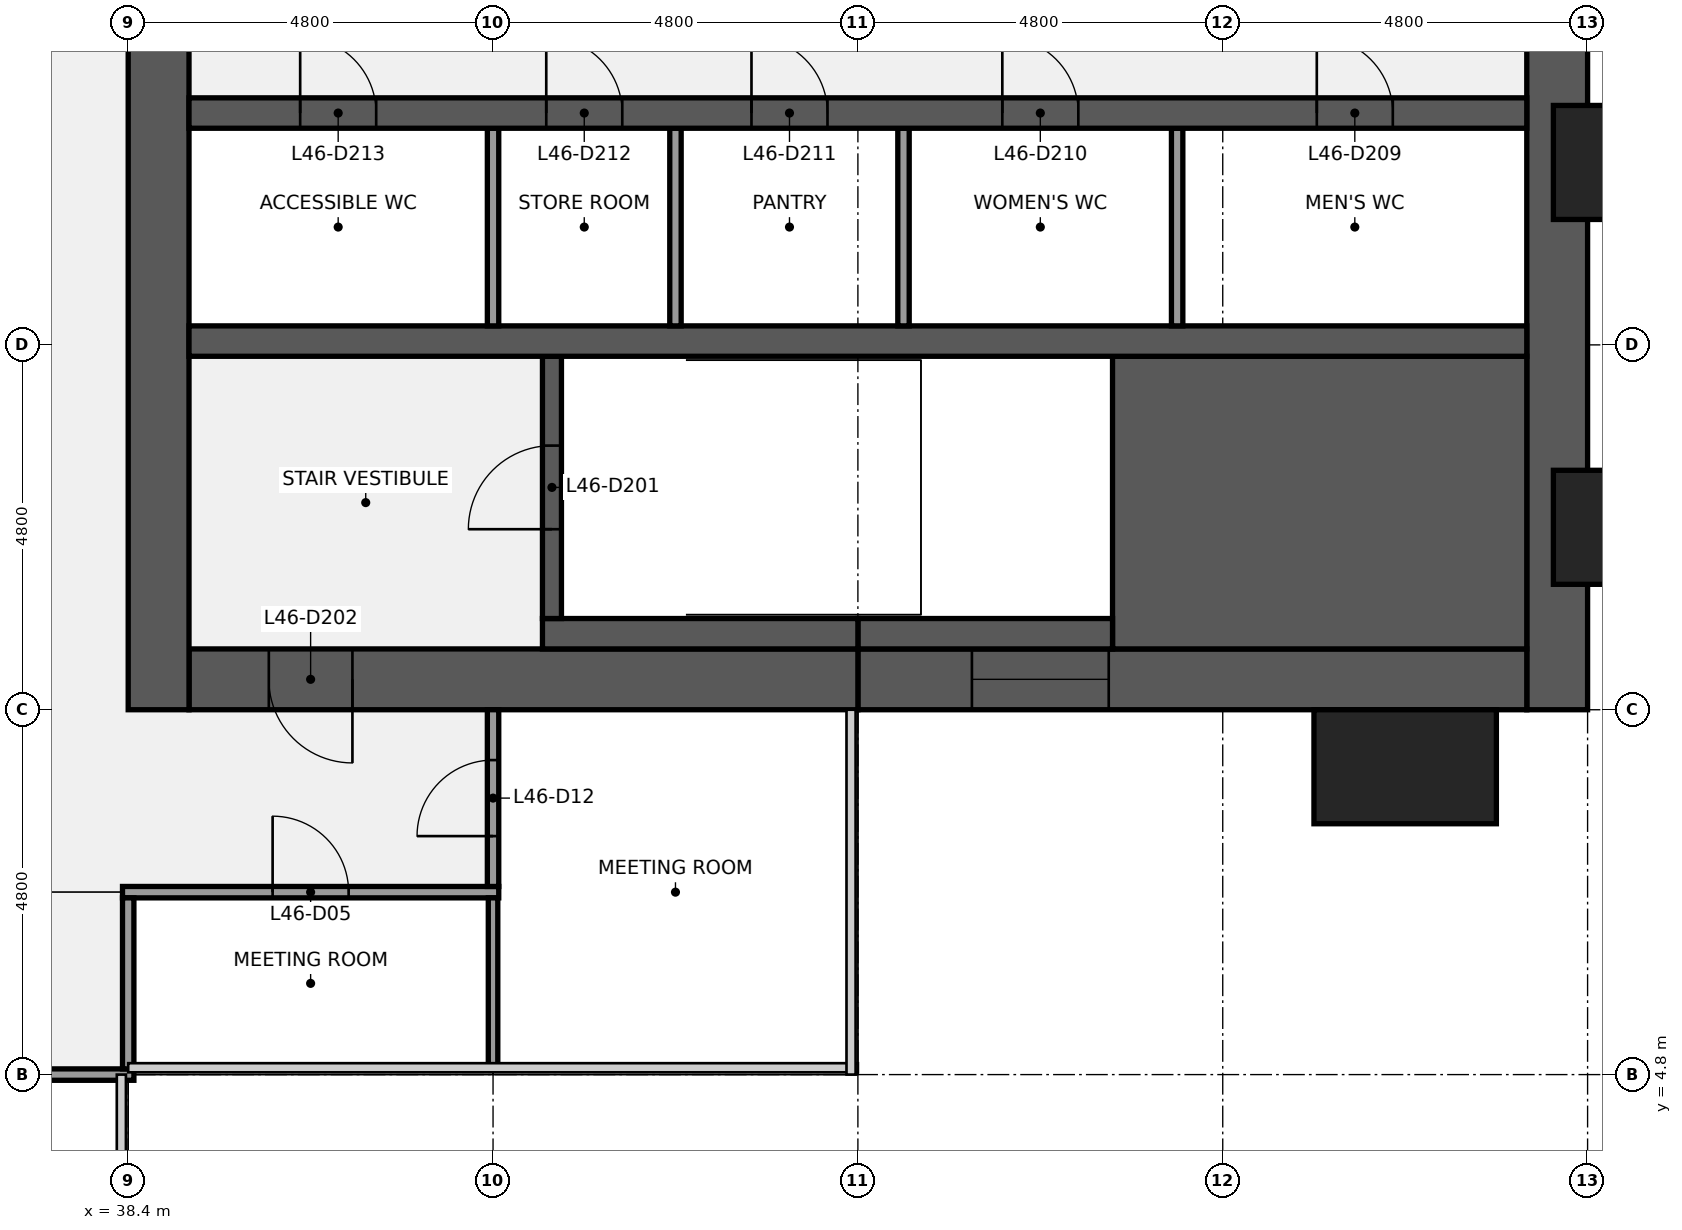
"""IFC4 building model, lengths in metres.
Left out: names, types, materials, properties, quantities, classifications, styles, units other than length and angle.
Written with IfcOpenShell. Run it as: python <this file> out.ifc"""

import sys

from ifc_helpers import new_model, si_unit, direction, frame, frame_2d, origin, origin_2d, place, context, subcontext, project, spatial, rectangle, extrude, element, fill, save


model = new_model("IFC4")
c1 = context("Model", 3, precision=1e-05, world=origin(), true_north=direction((0.0, 1.0)))
c2 = subcontext(c1, "Body", "Model", "MODEL_VIEW")
j1 = project(units=[si_unit("LENGTHUNIT", "METRE"), si_unit("PLANEANGLEUNIT", "RADIAN")], contexts=[c1])
p1 = place(None, origin())
s1 = spatial("IfcSite", under=j1, at=p1, CompositionType="ELEMENT")
p2 = place(p1, origin())
s2 = spatial("IfcBuilding", under=s1, at=p2, CompositionType="ELEMENT")
p3 = place(p2, frame((0.0, 0.0, 213.2)))
s3 = spatial("IfcBuildingStorey", under=s2, at=p3, CompositionType="ELEMENT", Elevation=213.2)
p4 = place(p3, frame((57.2, 38.4, 0.0), z_axis=(0.0, 0.0, 1.0), x_axis=(0.0, -1.0, 0.0)))
e1 = element("IfcWall", 1, at=p4, inside=s3, PredefinedType="SHEAR", context=c2, shape_type="SweptSolid", body=[
    extrude(rectangle(XDim=28.8, YDim=0.8, at=frame_2d((14.4, 0.0))), origin(), (0.0, 0.0, 1.0), 3.84),
])
p5 = place(p4, frame((18.45, 0.0, 0.9)))
e2 = element("IfcOpeningElement", 2, at=p5, cuts=e1, PredefinedType="OPENING", context=c2, shape_type="SweptSolid", body=[
    extrude(rectangle(XDim=1.5, YDim=1.5, at=frame_2d((0.75, 0.75))), frame((0.0, 0.41, 0.0), z_axis=(0.0, -1.0, 0.0), x_axis=(1.0, 0.0, 0.0)), (0.0, 0.0, 1.0), 0.82),
])
p6 = place(p4, frame((8.85, 0.0, 0.9)))
e3 = element("IfcOpeningElement", 3, at=p6, cuts=e1, PredefinedType="OPENING", context=c2, shape_type="SweptSolid", body=[
    extrude(rectangle(XDim=1.5, YDim=1.5, at=frame_2d((0.75, 0.75))), frame((0.0, 0.41, 0.0), z_axis=(0.0, -1.0, 0.0), x_axis=(1.0, 0.0, 0.0)), (0.0, 0.0, 1.0), 0.82),
])
p7 = place(p3, frame((56.8, 10.0, 0.0), z_axis=(0.0, 0.0, 1.0), x_axis=(-1.0, 0.0, 0.0)))
e4 = element("IfcWall", 4, at=p7, inside=s3, PredefinedType="SHEAR", context=c2, shape_type="SweptSolid", body=[
    extrude(rectangle(XDim=8.8, YDim=0.8, at=frame_2d((4.4, 0.0))), origin(), (0.0, 0.0, 1.0), 3.84),
])
p8 = place(p7, frame((5.5, 0.0, 0.9)))
e5 = element("IfcOpeningElement", 5, at=p8, cuts=e4, PredefinedType="OPENING", context=c2, shape_type="SweptSolid", body=[
    extrude(rectangle(XDim=1.8, YDim=1.5, at=frame_2d((0.9, 0.75))), frame((0.0, 0.41, 0.0), z_axis=(0.0, -1.0, 0.0), x_axis=(1.0, 0.0, 0.0)), (0.0, 0.0, 1.0), 0.82),
])
p9 = place(p3, frame((48.0, 10.0, 0.0), z_axis=(0.0, 0.0, 1.0), x_axis=(-1.0, 0.0, 0.0)))
e6 = element("IfcWall", 6, at=p9, inside=s3, PredefinedType="SHEAR", context=c2, shape_type="SweptSolid", body=[
    extrude(rectangle(XDim=8.8, YDim=0.8, at=frame_2d((4.4, 0.0))), origin(), (0.0, 0.0, 1.0), 3.84),
])
p10 = place(p9, frame((6.65, 0.0, 0.0)))
e7 = element("IfcOpeningElement", 7, at=p10, cuts=e6, PredefinedType="OPENING", context=c2, shape_type="SweptSolid", body=[
    extrude(rectangle(XDim=1.1, YDim=2.1, at=frame_2d((0.55, 1.05))), frame((0.0, 0.41, 0.0), z_axis=(0.0, -1.0, 0.0), x_axis=(1.0, 0.0, 0.0)), (0.0, 0.0, 1.0), 0.82),
])
p11 = place(p3, frame((38.8, 9.6, 0.0), z_axis=(0.0, 0.0, 1.0), x_axis=(0.0, 1.0, 0.0)))
e8 = element("IfcWall", 8, at=p11, inside=s3, PredefinedType="SHEAR", context=c2, shape_type="SweptSolid", body=[
    extrude(rectangle(XDim=28.8, YDim=0.8, at=frame_2d((14.4, 0.0))), origin(), (0.0, 0.0, 1.0), 3.84),
])
p12 = place(p11, frame((8.7, 0.0, 0.0)))
e9 = element("IfcOpeningElement", 9, at=p12, cuts=e8, PredefinedType="OPENING", context=c2, shape_type="SweptSolid", body=[
    extrude(rectangle(XDim=1.8, YDim=2.1, at=frame_2d((0.9, 1.05))), frame((0.0, 0.41, 0.0), z_axis=(0.0, -1.0, 0.0), x_axis=(1.0, 0.0, 0.0)), (0.0, 0.0, 1.0), 0.82),
])
p13 = place(p11, frame((18.3, 0.0, 0.0)))
e10 = element("IfcOpeningElement", 10, at=p13, cuts=e8, PredefinedType="OPENING", context=c2, shape_type="SweptSolid", body=[
    extrude(rectangle(XDim=1.8, YDim=2.1, at=frame_2d((0.9, 1.05))), frame((0.0, 0.41, 0.0), z_axis=(0.0, -1.0, 0.0), x_axis=(1.0, 0.0, 0.0)), (0.0, 0.0, 1.0), 0.82),
])
p14 = place(p3, frame((51.35, 12.325, 0.0), z_axis=(0.0, 0.0, 1.0), x_axis=(1.0, 0.0, 0.0)))
e11 = element("IfcWall", 11, at=p14, inside=s3, PredefinedType="SHEAR", context=c2, shape_type="SweptSolid", body=[
    extrude(rectangle(XDim=5.45, YDim=3.85, at=frame_2d((2.725, 0.0))), origin(), (0.0, 0.0, 1.0), 3.84),
])
p15 = place(p3, frame((48.0, 10.6, 0.0), z_axis=(0.0, 0.0, 1.0), x_axis=(1.0, 0.0, 0.0)))
e12 = element("IfcWall", 12, at=p15, inside=s3, PredefinedType="SHEAR", context=c2, shape_type="SweptSolid", body=[
    extrude(rectangle(XDim=3.35, YDim=0.4, at=frame_2d((1.675, 0.0))), origin(), (0.0, 0.0, 1.0), 3.84),
])
p16 = place(p3, frame((43.85, 10.6, 0.0), z_axis=(0.0, 0.0, 1.0), x_axis=(1.0, 0.0, 0.0)))
e13 = element("IfcWall", 13, at=p16, inside=s3, PredefinedType="SHEAR", context=c2, shape_type="SweptSolid", body=[
    extrude(rectangle(XDim=4.15, YDim=0.4, at=frame_2d((2.075, 0.0))), origin(), (0.0, 0.0, 1.0), 3.84),
])
p17 = place(p3, frame((43.975, 10.8, 0.0), z_axis=(0.0, 0.0, 1.0), x_axis=(0.0, 1.0, 0.0)))
e14 = element("IfcWall", 14, at=p17, inside=s3, PredefinedType="SHEAR", context=c2, shape_type="SweptSolid", body=[
    extrude(rectangle(XDim=3.45, YDim=0.25, at=frame_2d((1.725, 0.0))), origin(), (0.0, 0.0, 1.0), 3.84),
])
p18 = place(p17, frame((1.175, 0.0, 0.0)))
e15 = element("IfcOpeningElement", 15, at=p18, cuts=e14, PredefinedType="OPENING", context=c2, shape_type="SweptSolid", body=[
    extrude(rectangle(XDim=1.1, YDim=2.1, at=frame_2d((0.55, 1.05))), frame((0.0, 0.135, 0.0), z_axis=(0.0, -1.0, 0.0), x_axis=(1.0, 0.0, 0.0)), (0.0, 0.0, 1.0), 0.27),
])
p19 = place(p3, frame((39.2, 14.45, 0.0), z_axis=(0.0, 0.0, 1.0), x_axis=(1.0, 0.0, 0.0)))
e16 = element("IfcWall", 16, at=p19, inside=s3, PredefinedType="SHEAR", context=c2, shape_type="SweptSolid", body=[
    extrude(rectangle(XDim=17.6, YDim=0.4, at=frame_2d((8.8, 0.0))), origin(), (0.0, 0.0, 1.0), 3.84),
])
for number, where, z_axis, x_axis in (
    (17, (52.2, 14.65, 0.0), (0.0, 0.0, 1.0), (0.0, 1.0, 0.0)),
    (18, (48.6, 14.65, 0.0), (0.0, 0.0, 1.0), (0.0, 1.0, 0.0)),
    (19, (45.6, 14.65, 0.0), (0.0, 0.0, 1.0), (0.0, 1.0, 0.0)),
    (20, (43.2, 14.65, 0.0), (0.0, 0.0, 1.0), (0.0, 1.0, 0.0)),
):
    element("IfcWall", number, at=place(p3, frame(where, z_axis=z_axis, x_axis=x_axis)), inside=s3, PredefinedType="PARTITIONING", context=c2, shape_type="SweptSolid", body=[
        extrude(rectangle(XDim=2.6, YDim=0.15, at=frame_2d((1.3, 0.0))), origin(), (0.0, 0.0, 1.0), 3.84),
    ])
p20 = place(p3, frame((39.2, 17.45, 0.0), z_axis=(0.0, 0.0, 1.0), x_axis=(1.0, 0.0, 0.0)))
e21 = element("IfcWall", 21, at=p20, inside=s3, PredefinedType="SHEAR", context=c2, shape_type="SweptSolid", body=[
    extrude(rectangle(XDim=17.6, YDim=0.4, at=frame_2d((8.8, 0.0))), origin(), (0.0, 0.0, 1.0), 3.84),
])
p21 = place(p20, frame((14.837, 0.0, 0.0)))
e22 = element("IfcOpeningElement", 22, at=p21, cuts=e21, PredefinedType="OPENING", context=c2, shape_type="SweptSolid", body=[
    extrude(rectangle(XDim=1.0, YDim=2.1, at=frame_2d((0.5, 1.05))), frame((0.0, 0.21, 0.0), z_axis=(0.0, -1.0, 0.0), x_axis=(1.0, 0.0, 0.0)), (0.0, 0.0, 1.0), 0.42),
])
p22 = place(p20, frame((10.7, 0.0, 0.0)))
e23 = element("IfcOpeningElement", 23, at=p22, cuts=e21, PredefinedType="OPENING", context=c2, shape_type="SweptSolid", body=[
    extrude(rectangle(XDim=1.0, YDim=2.1, at=frame_2d((0.5, 1.05))), frame((0.0, 0.21, 0.0), z_axis=(0.0, -1.0, 0.0), x_axis=(1.0, 0.0, 0.0)), (0.0, 0.0, 1.0), 0.42),
])
p23 = place(p20, frame((7.4, 0.0, 0.0)))
e24 = element("IfcOpeningElement", 24, at=p23, cuts=e21, PredefinedType="OPENING", context=c2, shape_type="SweptSolid", body=[
    extrude(rectangle(XDim=1.0, YDim=2.1, at=frame_2d((0.5, 1.05))), frame((0.0, 0.21, 0.0), z_axis=(0.0, -1.0, 0.0), x_axis=(1.0, 0.0, 0.0)), (0.0, 0.0, 1.0), 0.42),
])
p24 = place(p20, frame((4.7, 0.0, 0.0)))
e25 = element("IfcOpeningElement", 25, at=p24, cuts=e21, PredefinedType="OPENING", context=c2, shape_type="SweptSolid", body=[
    extrude(rectangle(XDim=1.0, YDim=2.1, at=frame_2d((0.5, 1.05))), frame((0.0, 0.21, 0.0), z_axis=(0.0, -1.0, 0.0), x_axis=(1.0, 0.0, 0.0)), (0.0, 0.0, 1.0), 0.42),
])
p25 = place(p20, frame((1.462, 0.0, 0.0)))
e26 = element("IfcOpeningElement", 26, at=p25, cuts=e21, PredefinedType="OPENING", context=c2, shape_type="SweptSolid", body=[
    extrude(rectangle(XDim=1.0, YDim=2.1, at=frame_2d((0.5, 1.05))), frame((0.0, 0.21, 0.0), z_axis=(0.0, -1.0, 0.0), x_axis=(1.0, 0.0, 0.0)), (0.0, 0.0, 1.0), 0.42),
])
p26 = place(p3, frame((19.125, 4.8, 0.0), z_axis=(0.0, 0.0, 1.0), x_axis=(1.0, 0.0, 0.0)))
e27 = element("IfcWall", 27, at=p26, inside=s3, PredefinedType="PARTITIONING", context=c2, shape_type="SweptSolid", body=[
    extrude(rectangle(XDim=19.35, YDim=0.15, at=frame_2d((9.675, 0.0))), origin(), (0.0, 0.0, 1.0), 2.87),
])
p27 = place(p26, frame((4.375, 0.0, 0.0)))
e28 = element("IfcOpeningElement", 28, at=p27, cuts=e27, PredefinedType="OPENING", context=c2, shape_type="SweptSolid", body=[
    extrude(rectangle(XDim=1.0, YDim=2.1, at=frame_2d((0.5, 1.05))), frame((0.0, 0.085, 0.0), z_axis=(0.0, -1.0, 0.0), x_axis=(1.0, 0.0, 0.0)), (0.0, 0.0, 1.0), 0.17),
])
p28 = place(p26, frame((13.975, 0.0, 0.0)))
e29 = element("IfcOpeningElement", 29, at=p28, cuts=e27, PredefinedType="OPENING", context=c2, shape_type="SweptSolid", body=[
    extrude(rectangle(XDim=1.0, YDim=2.1, at=frame_2d((0.5, 1.05))), frame((0.0, 0.085, 0.0), z_axis=(0.0, -1.0, 0.0), x_axis=(1.0, 0.0, 0.0)), (0.0, 0.0, 1.0), 0.17),
])
p29 = place(p3, frame((38.325, 7.2, 0.0), z_axis=(0.0, 0.0, 1.0), x_axis=(1.0, 0.0, 0.0)))
e30 = element("IfcWall", 30, at=p29, inside=s3, PredefinedType="PARTITIONING", context=c2, shape_type="SweptSolid", body=[
    extrude(rectangle(XDim=4.95, YDim=0.15, at=frame_2d((2.475, 0.0))), origin(), (0.0, 0.0, 1.0), 2.87),
])
p30 = place(p29, frame((1.975, 0.0, 0.0)))
e31 = element("IfcOpeningElement", 31, at=p30, cuts=e30, PredefinedType="OPENING", context=c2, shape_type="SweptSolid", body=[
    extrude(rectangle(XDim=1.0, YDim=2.1, at=frame_2d((0.5, 1.05))), frame((0.0, 0.085, 0.0), z_axis=(0.0, -1.0, 0.0), x_axis=(1.0, 0.0, 0.0)), (0.0, 0.0, 1.0), 0.17),
])
p31 = place(p3, frame((38.4, 4.875, 0.0), z_axis=(0.0, 0.0, 1.0), x_axis=(0.0, 1.0, 0.0)))
e32 = element("IfcWall", 32, at=p31, inside=s3, PredefinedType="PARTITIONING", context=c2, shape_type="SweptSolid", body=[
    extrude(rectangle(XDim=2.25, YDim=0.15, at=frame_2d((1.125, 0.0))), origin(), (0.0, 0.0, 1.0), 2.87),
])
p32 = place(p3, frame((43.2, 4.9, 0.0), z_axis=(0.0, 0.0, 1.0), x_axis=(0.0, 1.0, 0.0)))
e33 = element("IfcWall", 33, at=p32, inside=s3, PredefinedType="PARTITIONING", context=c2, shape_type="SweptSolid", body=[
    extrude(rectangle(XDim=2.225, YDim=0.125, at=frame_2d((1.113, 0.0))), origin(), (0.0, 0.0, 1.0), 2.87),
])
p33 = place(p3, frame((43.2, 7.275, 0.0), z_axis=(0.0, 0.0, 1.0), x_axis=(0.0, 1.0, 0.0)))
e34 = element("IfcWall", 34, at=p33, inside=s3, PredefinedType="PARTITIONING", context=c2, shape_type="SweptSolid", body=[
    extrude(rectangle(XDim=2.325, YDim=0.15, at=frame_2d((1.163, 0.0))), origin(), (0.0, 0.0, 1.0), 2.87),
])
p34 = place(p33, frame((0.663, 0.0, 0.0)))
e35 = element("IfcOpeningElement", 35, at=p34, cuts=e34, PredefinedType="OPENING", context=c2, shape_type="SweptSolid", body=[
    extrude(rectangle(XDim=1.0, YDim=2.1, at=frame_2d((0.5, 1.05))), frame((0.0, 0.085, 0.0), z_axis=(0.0, -1.0, 0.0), x_axis=(1.0, 0.0, 0.0)), (0.0, 0.0, 1.0), 0.17),
])
for number, where, z_axis, x_axis in (
    (36, (55.2, 8.85, 0.0), (0.0, 0.0, 1.0), (1.0, 0.0, 0.0)),
    (37, (58.35, 12.0, 0.0), (0.0, 0.0, 1.0), (0.0, 1.0, 0.0)),
    (38, (58.35, 16.8, 0.0), (0.0, 0.0, 1.0), (0.0, 1.0, 0.0)),
):
    element("IfcColumn", number, at=place(p3, frame(where, z_axis=z_axis, x_axis=x_axis)), inside=s3, PredefinedType="PILASTER", context=c2, shape_type="SweptSolid", body=[
        extrude(rectangle(XDim=2.4, YDim=1.5, at=origin_2d()), origin(), (0.0, 0.0, 1.0), 4.0),
    ])
p35 = place(p18, origin())
e39 = element("IfcDoor", 39, at=p35, inside=s3, OperationType="SINGLE_SWING_LEFT", PredefinedType="DOOR", context=c2, shape_type="SweptSolid", body=[
    extrude(rectangle(XDim=1.1, YDim=2.1, at=frame_2d((0.55, 1.05))), frame((0.0, 0.025, 0.0), z_axis=(0.0, -1.0, 0.0), x_axis=(1.0, 0.0, 0.0)), (0.0, 0.0, 1.0), 0.05),
])
fill(e15, e39)
p36 = place(p10, origin())
e40 = element("IfcDoor", 40, at=p36, inside=s3, OperationType="SINGLE_SWING_LEFT", PredefinedType="DOOR", context=c2, shape_type="SweptSolid", body=[
    extrude(rectangle(XDim=1.1, YDim=2.1, at=frame_2d((0.55, 1.05))), frame((0.0, 0.025, 0.0), z_axis=(0.0, -1.0, 0.0), x_axis=(1.0, 0.0, 0.0)), (0.0, 0.0, 1.0), 0.05),
])
fill(e7, e40)
p37 = place(p21, origin())
e41 = element("IfcDoor", 41, at=p37, inside=s3, OperationType="SINGLE_SWING_LEFT", PredefinedType="DOOR", context=c2, shape_type="SweptSolid", body=[
    extrude(rectangle(XDim=1.0, YDim=2.1, at=frame_2d((0.5, 1.05))), frame((0.0, 0.025, 0.0), z_axis=(0.0, -1.0, 0.0), x_axis=(1.0, 0.0, 0.0)), (0.0, 0.0, 1.0), 0.05),
])
fill(e22, e41)
p38 = place(p22, origin())
e42 = element("IfcDoor", 42, at=p38, inside=s3, OperationType="SINGLE_SWING_LEFT", PredefinedType="DOOR", context=c2, shape_type="SweptSolid", body=[
    extrude(rectangle(XDim=1.0, YDim=2.1, at=frame_2d((0.5, 1.05))), frame((0.0, 0.025, 0.0), z_axis=(0.0, -1.0, 0.0), x_axis=(1.0, 0.0, 0.0)), (0.0, 0.0, 1.0), 0.05),
])
fill(e23, e42)
p39 = place(p23, origin())
e43 = element("IfcDoor", 43, at=p39, inside=s3, OperationType="SINGLE_SWING_LEFT", PredefinedType="DOOR", context=c2, shape_type="SweptSolid", body=[
    extrude(rectangle(XDim=1.0, YDim=2.1, at=frame_2d((0.5, 1.05))), frame((0.0, 0.025, 0.0), z_axis=(0.0, -1.0, 0.0), x_axis=(1.0, 0.0, 0.0)), (0.0, 0.0, 1.0), 0.05),
])
fill(e24, e43)
p40 = place(p24, origin())
e44 = element("IfcDoor", 44, at=p40, inside=s3, OperationType="SINGLE_SWING_LEFT", PredefinedType="DOOR", context=c2, shape_type="SweptSolid", body=[
    extrude(rectangle(XDim=1.0, YDim=2.1, at=frame_2d((0.5, 1.05))), frame((0.0, 0.025, 0.0), z_axis=(0.0, -1.0, 0.0), x_axis=(1.0, 0.0, 0.0)), (0.0, 0.0, 1.0), 0.05),
])
fill(e25, e44)
p41 = place(p25, origin())
e45 = element("IfcDoor", 45, at=p41, inside=s3, OperationType="SINGLE_SWING_LEFT", PredefinedType="DOOR", context=c2, shape_type="SweptSolid", body=[
    extrude(rectangle(XDim=1.0, YDim=2.1, at=frame_2d((0.5, 1.05))), frame((0.0, 0.025, 0.0), z_axis=(0.0, -1.0, 0.0), x_axis=(1.0, 0.0, 0.0)), (0.0, 0.0, 1.0), 0.05),
])
fill(e26, e45)
p42 = place(p8, origin())
e46 = element("IfcWindow", 46, at=p42, inside=s3, PartitioningType="SINGLE_PANEL", PredefinedType="WINDOW", context=c2, shape_type="SweptSolid", body=[
    extrude(rectangle(XDim=1.8, YDim=1.5, at=frame_2d((0.9, 0.75))), frame((0.0, 0.03, 0.0), z_axis=(0.0, -1.0, 0.0), x_axis=(1.0, 0.0, 0.0)), (0.0, 0.0, 1.0), 0.06),
])
fill(e5, e46)
p43 = place(p30, origin())
e47 = element("IfcDoor", 47, at=p43, inside=s3, OperationType="SINGLE_SWING_LEFT", PredefinedType="DOOR", context=c2, shape_type="SweptSolid", body=[
    extrude(rectangle(XDim=1.0, YDim=2.1, at=frame_2d((0.5, 1.05))), frame((0.0, 0.025, 0.0), z_axis=(0.0, -1.0, 0.0), x_axis=(1.0, 0.0, 0.0)), (0.0, 0.0, 1.0), 0.05),
])
fill(e31, e47)
p44 = place(p34, origin())
e48 = element("IfcDoor", 48, at=p44, inside=s3, OperationType="SINGLE_SWING_LEFT", PredefinedType="DOOR", context=c2, shape_type="SweptSolid", body=[
    extrude(rectangle(XDim=1.0, YDim=2.1, at=frame_2d((0.5, 1.05))), frame((0.0, 0.025, 0.0), z_axis=(0.0, -1.0, 0.0), x_axis=(1.0, 0.0, 0.0)), (0.0, 0.0, 1.0), 0.05),
])
fill(e35, e48)
save(model, sys.argv[1])
